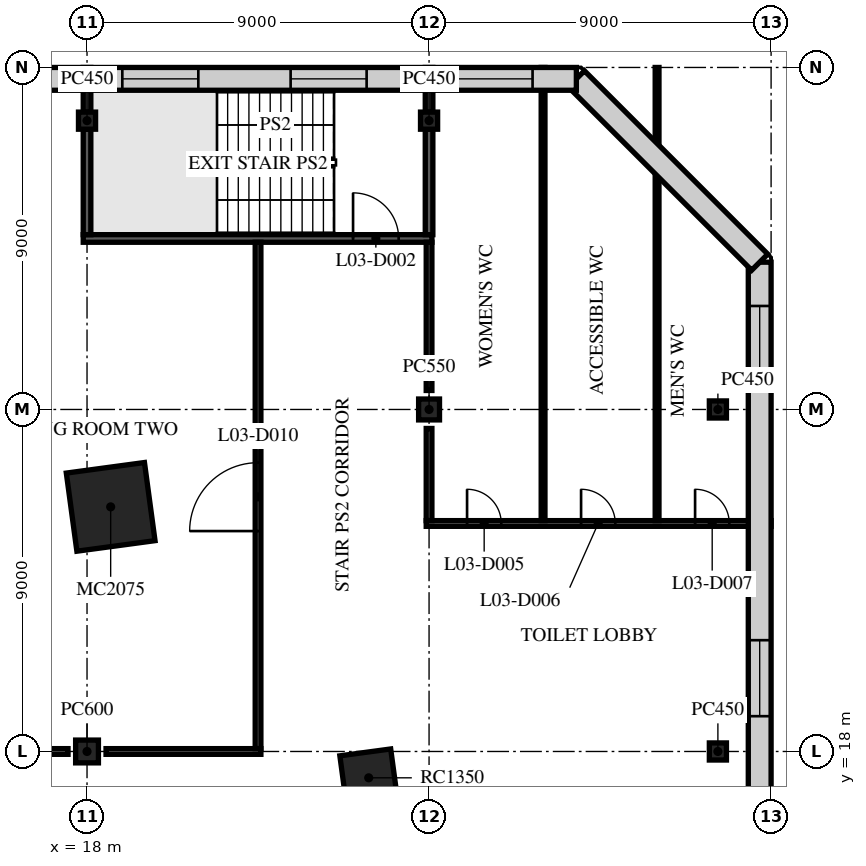
"""IFC4 building model, lengths in metres.
Left out: names, types, materials, properties, quantities, classifications, styles, units other than length and angle.
Written with IfcOpenShell. Run it as: python <this file> out.ifc"""

import sys

from ifc_helpers import new_model, si_unit, direction, frame, frame_2d, origin, origin_2d, place, context, subcontext, project, spatial, rectangle, extrude, element, fill, save


model = new_model("IFC4")
c1 = context("Model", 3, precision=1e-05, world=origin(), true_north=direction((0.0, 1.0)))
c2 = subcontext(c1, "Body", "Model", "MODEL_VIEW")
j1 = project(units=[si_unit("LENGTHUNIT", "METRE"), si_unit("PLANEANGLEUNIT", "RADIAN")], contexts=[c1])
p1 = place(None, origin())
s1 = spatial("IfcSite", under=j1, at=p1, CompositionType="ELEMENT")
p2 = place(p1, origin())
s2 = spatial("IfcBuilding", under=s1, at=p2, CompositionType="ELEMENT")
p3 = place(p2, frame((0.0, 0.0, 13.5)))
s3 = spatial("IfcBuildingStorey", under=s2, at=p3, CompositionType="ELEMENT", Elevation=13.5)
p4 = place(p3, frame((18.0, 18.0, 0.0), z_axis=(0.0, 0.0, 1.0), x_axis=(1.0, 0.0, 0.0)))
e1 = element("IfcColumn", 1, at=p4, inside=s3, PredefinedType="COLUMN", context=c2, shape_type="SweptSolid", body=[
    extrude(rectangle(XDim=0.6, YDim=0.6, at=origin_2d()), origin(), (0.0, 0.0, 1.0), 4.5),
])
p5 = place(p3, frame((18.0, 34.6, 0.0), z_axis=(0.0, 0.0, 1.0), x_axis=(1.0, 0.0, 0.0)))
e2 = element("IfcColumn", 2, at=p5, inside=s3, PredefinedType="COLUMN", context=c2, shape_type="SweptSolid", body=[
    extrude(rectangle(XDim=0.45, YDim=0.45, at=origin_2d()), origin(), (0.0, 0.0, 1.0), 4.5),
])
p6 = place(p3, frame((27.0, 27.0, 0.0), z_axis=(0.0, 0.0, 1.0), x_axis=(1.0, 0.0, 0.0)))
e3 = element("IfcColumn", 3, at=p6, inside=s3, PredefinedType="COLUMN", context=c2, shape_type="SweptSolid", body=[
    extrude(rectangle(XDim=0.55, YDim=0.55, at=origin_2d()), origin(), (0.0, 0.0, 1.0), 4.5),
])
for number, where, z_axis, x_axis in (
    (4, (27.0, 34.6, 0.0), (0.0, 0.0, 1.0), (1.0, 0.0, 0.0)),
    (5, (34.6, 18.0, 0.0), (0.0, 0.0, 1.0), (1.0, 0.0, 0.0)),
    (6, (34.6, 27.0, 0.0), (0.0, 0.0, 1.0), (1.0, 0.0, 0.0)),
):
    element("IfcColumn", number, at=place(p3, frame(where, z_axis=z_axis, x_axis=x_axis)), inside=s3, PredefinedType="COLUMN", context=c2, shape_type="SweptSolid", body=[
        extrude(rectangle(XDim=0.45, YDim=0.45, at=origin_2d()), origin(), (0.0, 0.0, 1.0), 4.5),
    ])
p7 = place(p3, frame((18.622, 24.437, 0.0), z_axis=(0.0, 0.0, 1.0), x_axis=(0.991001197216, 0.133853005627, 0.0)))
e7 = element("IfcColumn", 7, at=p7, inside=s3, PredefinedType="COLUMN", context=c2, shape_type="SweptSolid", body=[
    extrude(rectangle(XDim=2.075, YDim=2.075, at=origin_2d()), origin(), (0.0, 0.0, 1.0), 4.5),
])
p8 = place(p3, frame((25.412, 17.307, 0.0), z_axis=(0.0, 0.0, 1.0), x_axis=(0.991001197216, 0.133853005627, 0.0)))
e8 = element("IfcColumn", 8, at=p8, inside=s3, PredefinedType="COLUMN", context=c2, shape_type="SweptSolid", body=[
    extrude(rectangle(XDim=1.35, YDim=1.35, at=origin_2d()), origin(), (0.0, 0.0, 1.0), 4.5),
])
p9 = place(p3, frame((9.5, 18.0, 0.0), z_axis=(0.0, 0.0, 1.0), x_axis=(1.0, 0.0, 0.0)))
e9 = element("IfcWall", 9, at=p9, inside=s3, PredefinedType="PARTITIONING", context=c2, shape_type="SweptSolid", body=[
    extrude(rectangle(XDim=8.0, YDim=0.15, at=frame_2d((4.0, 0.0))), origin(), (0.0, 0.0, 1.0), 4.1),
])
p10 = place(p3, frame((18.5, 18.0, 0.0), z_axis=(0.0, 0.0, 1.0), x_axis=(1.0, 0.0, 0.0)))
e10 = element("IfcWall", 10, at=p10, inside=s3, PredefinedType="PARTITIONING", context=c2, shape_type="SweptSolid", body=[
    extrude(rectangle(XDim=4.075, YDim=0.15, at=frame_2d((2.038, 0.0))), origin(), (0.0, 0.0, 1.0), 4.1),
])
p11 = place(p3, frame((26.925, 24.0, 0.0), z_axis=(0.0, 0.0, 1.0), x_axis=(1.0, 0.0, 0.0)))
e11 = element("IfcWall", 11, at=p11, inside=s3, PredefinedType="PARTITIONING", context=c2, shape_type="SweptSolid", body=[
    extrude(rectangle(XDim=9.075, YDim=0.15, at=frame_2d((4.538, 0.0))), origin(), (0.0, 0.0, 1.0), 4.1),
])
p12 = place(p11, frame((1.075, 0.0, 0.0)))
e12 = element("IfcOpeningElement", 12, at=p12, cuts=e11, PredefinedType="OPENING", context=c2, shape_type="SweptSolid", body=[
    extrude(rectangle(XDim=0.9, YDim=2.1, at=frame_2d((0.45, 1.05))), frame((0.0, 0.085, 0.0), z_axis=(0.0, -1.0, 0.0), x_axis=(1.0, 0.0, 0.0)), (0.0, 0.0, 1.0), 0.17),
])
p13 = place(p11, frame((4.075, 0.0, 0.0)))
e13 = element("IfcOpeningElement", 13, at=p13, cuts=e11, PredefinedType="OPENING", context=c2, shape_type="SweptSolid", body=[
    extrude(rectangle(XDim=0.9, YDim=2.1, at=frame_2d((0.45, 1.05))), frame((0.0, 0.085, 0.0), z_axis=(0.0, -1.0, 0.0), x_axis=(1.0, 0.0, 0.0)), (0.0, 0.0, 1.0), 0.17),
])
p14 = place(p11, frame((7.075, 0.0, 0.0)))
e14 = element("IfcOpeningElement", 14, at=p14, cuts=e11, PredefinedType="OPENING", context=c2, shape_type="SweptSolid", body=[
    extrude(rectangle(XDim=0.9, YDim=2.1, at=frame_2d((0.45, 1.05))), frame((0.0, 0.085, 0.0), z_axis=(0.0, -1.0, 0.0), x_axis=(1.0, 0.0, 0.0)), (0.0, 0.0, 1.0), 0.17),
])
p15 = place(p3, frame((17.9, 31.5, 0.0), z_axis=(0.0, 0.0, 1.0), x_axis=(1.0, 0.0, 0.0)))
e15 = element("IfcWall", 15, at=p15, inside=s3, PredefinedType="PARTITIONING", context=c2, shape_type="SweptSolid", body=[
    extrude(rectangle(XDim=9.175, YDim=0.2, at=frame_2d((4.587, 0.0))), origin(), (0.0, 0.0, 1.0), 4.1),
])
p16 = place(p15, frame((7.1, 0.0, 0.0)))
e16 = element("IfcOpeningElement", 16, at=p16, cuts=e15, PredefinedType="OPENING", context=c2, shape_type="SweptSolid", body=[
    extrude(rectangle(XDim=1.2, YDim=2.1, at=frame_2d((0.6, 1.05))), frame((0.0, 0.11, 0.0), z_axis=(0.0, -1.0, 0.0), x_axis=(1.0, 0.0, 0.0)), (0.0, 0.0, 1.0), 0.22),
])
p17 = place(p3, frame((18.0, 31.6, 0.0), z_axis=(0.0, 0.0, 1.0), x_axis=(0.0, 1.0, 0.0)))
e17 = element("IfcWall", 17, at=p17, inside=s3, PredefinedType="PARTITIONING", context=c2, shape_type="SweptSolid", body=[
    extrude(rectangle(XDim=2.775, YDim=0.2, at=frame_2d((1.387, 0.0))), origin(), (0.0, 0.0, 1.0), 4.1),
])
p18 = place(p3, frame((18.0, 34.825, 0.0), z_axis=(0.0, 0.0, 1.0), x_axis=(0.0, 1.0, 0.0)))
e18 = element("IfcWall", 18, at=p18, inside=s3, PredefinedType="PARTITIONING", context=c2, shape_type="SweptSolid", body=[
    extrude(rectangle(XDim=1.175, YDim=0.2, at=frame_2d((0.587, 0.0))), origin(), (0.0, 0.0, 1.0), 4.1),
])
p19 = place(p3, frame((22.5, 18.075, 0.0), z_axis=(0.0, 0.0, 1.0), x_axis=(0.0, 1.0, 0.0)))
e19 = element("IfcWall", 19, at=p19, inside=s3, PredefinedType="PARTITIONING", context=c2, shape_type="SweptSolid", body=[
    extrude(rectangle(XDim=13.325, YDim=0.15, at=frame_2d((6.663, 0.0))), origin(), (0.0, 0.0, 1.0), 4.1),
])
p20 = place(p19, frame((5.725, 0.0, 0.0)))
e20 = element("IfcOpeningElement", 20, at=p20, cuts=e19, PredefinedType="OPENING", context=c2, shape_type="SweptSolid", body=[
    extrude(rectangle(XDim=1.8, YDim=2.1, at=frame_2d((0.9, 1.05))), frame((0.0, 0.085, 0.0), z_axis=(0.0, -1.0, 0.0), x_axis=(1.0, 0.0, 0.0)), (0.0, 0.0, 1.0), 0.17),
])
p21 = place(p3, frame((27.0, 24.075, 0.0), z_axis=(0.0, 0.0, 1.0), x_axis=(0.0, 1.0, 0.0)))
e21 = element("IfcWall", 21, at=p21, inside=s3, PredefinedType="PARTITIONING", context=c2, shape_type="SweptSolid", body=[
    extrude(rectangle(XDim=2.425, YDim=0.15, at=frame_2d((1.212, 0.0))), origin(), (0.0, 0.0, 1.0), 4.1),
])
p22 = place(p3, frame((27.0, 27.5, 0.0), z_axis=(0.0, 0.0, 1.0), x_axis=(0.0, 1.0, 0.0)))
e22 = element("IfcWall", 22, at=p22, inside=s3, PredefinedType="PARTITIONING", context=c2, shape_type="SweptSolid", body=[
    extrude(rectangle(XDim=3.9, YDim=0.15, at=frame_2d((1.95, 0.0))), origin(), (0.0, 0.0, 1.0), 4.1),
])
p23 = place(p3, frame((27.0, 31.6, 0.0), z_axis=(0.0, 0.0, 1.0), x_axis=(0.0, 1.0, 0.0)))
e23 = element("IfcWall", 23, at=p23, inside=s3, PredefinedType="PARTITIONING", context=c2, shape_type="SweptSolid", body=[
    extrude(rectangle(XDim=2.775, YDim=0.2, at=frame_2d((1.387, 0.0))), origin(), (0.0, 0.0, 1.0), 4.1),
])
p24 = place(p3, frame((27.0, 34.825, 0.0), z_axis=(0.0, 0.0, 1.0), x_axis=(0.0, 1.0, 0.0)))
e24 = element("IfcWall", 24, at=p24, inside=s3, PredefinedType="PARTITIONING", context=c2, shape_type="SweptSolid", body=[
    extrude(rectangle(XDim=1.175, YDim=0.2, at=frame_2d((0.587, 0.0))), origin(), (0.0, 0.0, 1.0), 4.1),
])
for number, where, z_axis, x_axis in (
    (25, (30.0, 24.075, 0.0), (0.0, 0.0, 1.0), (0.0, 1.0, 0.0)),
    (26, (33.0, 24.075, 0.0), (0.0, 0.0, 1.0), (0.0, 1.0, 0.0)),
):
    element("IfcWall", number, at=place(p3, frame(where, z_axis=z_axis, x_axis=x_axis)), inside=s3, PredefinedType="PARTITIONING", context=c2, shape_type="SweptSolid", body=[
        extrude(rectangle(XDim=11.925, YDim=0.1, at=frame_2d((5.962, 0.0))), origin(), (0.0, 0.0, 1.0), 4.1),
    ])
p25 = place(p3, frame((35.7, -30.876, 0.0), z_axis=(0.0, 0.0, 1.0), x_axis=(0.0, 1.0, 0.0)))
e27 = element("IfcWall", 27, at=p25, inside=s3, PredefinedType="STANDARD", context=c2, shape_type="SweptSolid", body=[
    extrude(rectangle(XDim=61.751, YDim=0.6, at=frame_2d((30.876, 0.0))), origin(), (0.0, 0.0, 1.0), 4.1),
])
p26 = place(p25, frame((1.152, 0.0, 0.9)))
e28 = element("IfcOpeningElement", 28, at=p26, cuts=e27, PredefinedType="OPENING", context=c2, shape_type="SweptSolid", body=[
    extrude(rectangle(XDim=2.0, YDim=3.0, at=frame_2d((1.0, 1.5))), frame((0.0, 0.31, 0.0), z_axis=(0.0, -1.0, 0.0), x_axis=(1.0, 0.0, 0.0)), (0.0, 0.0, 1.0), 0.62),
])
p27 = place(p25, frame((5.519, 0.0, 0.9)))
e29 = element("IfcOpeningElement", 29, at=p27, cuts=e27, PredefinedType="OPENING", context=c2, shape_type="SweptSolid", body=[
    extrude(rectangle(XDim=2.0, YDim=3.0, at=frame_2d((1.0, 1.5))), frame((0.0, 0.31, 0.0), z_axis=(0.0, -1.0, 0.0), x_axis=(1.0, 0.0, 0.0)), (0.0, 0.0, 1.0), 0.62),
])
p28 = place(p25, frame((9.947, 0.0, 0.9)))
e30 = element("IfcOpeningElement", 30, at=p28, cuts=e27, PredefinedType="OPENING", context=c2, shape_type="SweptSolid", body=[
    extrude(rectangle(XDim=2.0, YDim=3.0, at=frame_2d((1.0, 1.5))), frame((0.0, 0.31, 0.0), z_axis=(0.0, -1.0, 0.0), x_axis=(1.0, 0.0, 0.0)), (0.0, 0.0, 1.0), 0.62),
])
p29 = place(p25, frame((14.376, 0.0, 0.9)))
e31 = element("IfcOpeningElement", 31, at=p29, cuts=e27, PredefinedType="OPENING", context=c2, shape_type="SweptSolid", body=[
    extrude(rectangle(XDim=2.0, YDim=3.0, at=frame_2d((1.0, 1.5))), frame((0.0, 0.31, 0.0), z_axis=(0.0, -1.0, 0.0), x_axis=(1.0, 0.0, 0.0)), (0.0, 0.0, 1.0), 0.62),
])
p30 = place(p25, frame((18.804, 0.0, 0.9)))
e32 = element("IfcOpeningElement", 32, at=p30, cuts=e27, PredefinedType="OPENING", context=c2, shape_type="SweptSolid", body=[
    extrude(rectangle(XDim=2.0, YDim=3.0, at=frame_2d((1.0, 1.5))), frame((0.0, 0.31, 0.0), z_axis=(0.0, -1.0, 0.0), x_axis=(1.0, 0.0, 0.0)), (0.0, 0.0, 1.0), 0.62),
])
p31 = place(p25, frame((23.233, 0.0, 0.9)))
e33 = element("IfcOpeningElement", 33, at=p31, cuts=e27, PredefinedType="OPENING", context=c2, shape_type="SweptSolid", body=[
    extrude(rectangle(XDim=2.0, YDim=3.0, at=frame_2d((1.0, 1.5))), frame((0.0, 0.31, 0.0), z_axis=(0.0, -1.0, 0.0), x_axis=(1.0, 0.0, 0.0)), (0.0, 0.0, 1.0), 0.62),
])
p32 = place(p25, frame((27.662, 0.0, 0.9)))
e34 = element("IfcOpeningElement", 34, at=p32, cuts=e27, PredefinedType="OPENING", context=c2, shape_type="SweptSolid", body=[
    extrude(rectangle(XDim=2.0, YDim=3.0, at=frame_2d((1.0, 1.5))), frame((0.0, 0.31, 0.0), z_axis=(0.0, -1.0, 0.0), x_axis=(1.0, 0.0, 0.0)), (0.0, 0.0, 1.0), 0.62),
])
p33 = place(p25, frame((32.09, 0.0, 0.9)))
e35 = element("IfcOpeningElement", 35, at=p33, cuts=e27, PredefinedType="OPENING", context=c2, shape_type="SweptSolid", body=[
    extrude(rectangle(XDim=2.0, YDim=3.0, at=frame_2d((1.0, 1.5))), frame((0.0, 0.31, 0.0), z_axis=(0.0, -1.0, 0.0), x_axis=(1.0, 0.0, 0.0)), (0.0, 0.0, 1.0), 0.62),
])
p34 = place(p25, frame((36.519, 0.0, 0.9)))
e36 = element("IfcOpeningElement", 36, at=p34, cuts=e27, PredefinedType="OPENING", context=c2, shape_type="SweptSolid", body=[
    extrude(rectangle(XDim=2.0, YDim=3.0, at=frame_2d((1.0, 1.5))), frame((0.0, 0.31, 0.0), z_axis=(0.0, -1.0, 0.0), x_axis=(1.0, 0.0, 0.0)), (0.0, 0.0, 1.0), 0.62),
])
p35 = place(p25, frame((45.376, 0.0, 0.9)))
e37 = element("IfcOpeningElement", 37, at=p35, cuts=e27, PredefinedType="OPENING", context=c2, shape_type="SweptSolid", body=[
    extrude(rectangle(XDim=2.0, YDim=3.0, at=frame_2d((1.0, 1.5))), frame((0.0, 0.31, 0.0), z_axis=(0.0, -1.0, 0.0), x_axis=(1.0, 0.0, 0.0)), (0.0, 0.0, 1.0), 0.62),
])
p36 = place(p25, frame((49.804, 0.0, 0.9)))
e38 = element("IfcOpeningElement", 38, at=p36, cuts=e27, PredefinedType="OPENING", context=c2, shape_type="SweptSolid", body=[
    extrude(rectangle(XDim=2.0, YDim=3.0, at=frame_2d((1.0, 1.5))), frame((0.0, 0.31, 0.0), z_axis=(0.0, -1.0, 0.0), x_axis=(1.0, 0.0, 0.0)), (0.0, 0.0, 1.0), 0.62),
])
p37 = place(p25, frame((58.599, 0.0, 0.9)))
e39 = element("IfcOpeningElement", 39, at=p37, cuts=e27, PredefinedType="OPENING", context=c2, shape_type="SweptSolid", body=[
    extrude(rectangle(XDim=2.0, YDim=3.0, at=frame_2d((1.0, 1.5))), frame((0.0, 0.31, 0.0), z_axis=(0.0, -1.0, 0.0), x_axis=(1.0, 0.0, 0.0)), (0.0, 0.0, 1.0), 0.62),
])
p38 = place(p3, frame((35.7, 30.876, 0.0), z_axis=(0.0, 0.0, 1.0), x_axis=(-0.707106781187, 0.707106781187, 0.0)))
e40 = element("IfcWall", 40, at=p38, inside=s3, PredefinedType="STANDARD", context=c2, shape_type="SweptSolid", body=[
    extrude(rectangle(XDim=6.823, YDim=0.6, at=frame_2d((3.411, 0.0))), origin(), (0.0, 0.0, 1.0), 4.1),
])
p39 = place(p3, frame((30.876, 35.7, 0.0), z_axis=(0.0, 0.0, 1.0), x_axis=(-1.0, 0.0, 0.0)))
e41 = element("IfcWall", 41, at=p39, inside=s3, PredefinedType="STANDARD", context=c2, shape_type="SweptSolid", body=[
    extrude(rectangle(XDim=61.751, YDim=0.6, at=frame_2d((30.876, 0.0))), origin(), (0.0, 0.0, 1.0), 4.1),
])
p40 = place(p39, frame((1.152, 0.0, 0.9)))
e42 = element("IfcOpeningElement", 42, at=p40, cuts=e41, PredefinedType="OPENING", context=c2, shape_type="SweptSolid", body=[
    extrude(rectangle(XDim=2.0, YDim=3.0, at=frame_2d((1.0, 1.5))), frame((0.0, 0.31, 0.0), z_axis=(0.0, -1.0, 0.0), x_axis=(1.0, 0.0, 0.0)), (0.0, 0.0, 1.0), 0.62),
])
p41 = place(p39, frame((5.519, 0.0, 0.9)))
e43 = element("IfcOpeningElement", 43, at=p41, cuts=e41, PredefinedType="OPENING", context=c2, shape_type="SweptSolid", body=[
    extrude(rectangle(XDim=2.0, YDim=3.0, at=frame_2d((1.0, 1.5))), frame((0.0, 0.31, 0.0), z_axis=(0.0, -1.0, 0.0), x_axis=(1.0, 0.0, 0.0)), (0.0, 0.0, 1.0), 0.62),
])
p42 = place(p39, frame((9.947, 0.0, 0.9)))
e44 = element("IfcOpeningElement", 44, at=p42, cuts=e41, PredefinedType="OPENING", context=c2, shape_type="SweptSolid", body=[
    extrude(rectangle(XDim=2.0, YDim=3.0, at=frame_2d((1.0, 1.5))), frame((0.0, 0.31, 0.0), z_axis=(0.0, -1.0, 0.0), x_axis=(1.0, 0.0, 0.0)), (0.0, 0.0, 1.0), 0.62),
])
p43 = place(p39, frame((14.376, 0.0, 0.9)))
e45 = element("IfcOpeningElement", 45, at=p43, cuts=e41, PredefinedType="OPENING", context=c2, shape_type="SweptSolid", body=[
    extrude(rectangle(XDim=2.0, YDim=3.0, at=frame_2d((1.0, 1.5))), frame((0.0, 0.31, 0.0), z_axis=(0.0, -1.0, 0.0), x_axis=(1.0, 0.0, 0.0)), (0.0, 0.0, 1.0), 0.62),
])
p44 = place(p39, frame((18.804, 0.0, 0.9)))
e46 = element("IfcOpeningElement", 46, at=p44, cuts=e41, PredefinedType="OPENING", context=c2, shape_type="SweptSolid", body=[
    extrude(rectangle(XDim=2.0, YDim=3.0, at=frame_2d((1.0, 1.5))), frame((0.0, 0.31, 0.0), z_axis=(0.0, -1.0, 0.0), x_axis=(1.0, 0.0, 0.0)), (0.0, 0.0, 1.0), 0.62),
])
p45 = place(p39, frame((23.233, 0.0, 0.9)))
e47 = element("IfcOpeningElement", 47, at=p45, cuts=e41, PredefinedType="OPENING", context=c2, shape_type="SweptSolid", body=[
    extrude(rectangle(XDim=2.0, YDim=3.0, at=frame_2d((1.0, 1.5))), frame((0.0, 0.31, 0.0), z_axis=(0.0, -1.0, 0.0), x_axis=(1.0, 0.0, 0.0)), (0.0, 0.0, 1.0), 0.62),
])
p46 = place(p39, frame((27.662, 0.0, 0.9)))
e48 = element("IfcOpeningElement", 48, at=p46, cuts=e41, PredefinedType="OPENING", context=c2, shape_type="SweptSolid", body=[
    extrude(rectangle(XDim=2.0, YDim=3.0, at=frame_2d((1.0, 1.5))), frame((0.0, 0.31, 0.0), z_axis=(0.0, -1.0, 0.0), x_axis=(1.0, 0.0, 0.0)), (0.0, 0.0, 1.0), 0.62),
])
p47 = place(p39, frame((32.09, 0.0, 0.9)))
e49 = element("IfcOpeningElement", 49, at=p47, cuts=e41, PredefinedType="OPENING", context=c2, shape_type="SweptSolid", body=[
    extrude(rectangle(XDim=2.0, YDim=3.0, at=frame_2d((1.0, 1.5))), frame((0.0, 0.31, 0.0), z_axis=(0.0, -1.0, 0.0), x_axis=(1.0, 0.0, 0.0)), (0.0, 0.0, 1.0), 0.62),
])
p48 = place(p39, frame((36.519, 0.0, 0.9)))
e50 = element("IfcOpeningElement", 50, at=p48, cuts=e41, PredefinedType="OPENING", context=c2, shape_type="SweptSolid", body=[
    extrude(rectangle(XDim=2.0, YDim=3.0, at=frame_2d((1.0, 1.5))), frame((0.0, 0.31, 0.0), z_axis=(0.0, -1.0, 0.0), x_axis=(1.0, 0.0, 0.0)), (0.0, 0.0, 1.0), 0.62),
])
p49 = place(p39, frame((40.947, 0.0, 0.9)))
e51 = element("IfcOpeningElement", 51, at=p49, cuts=e41, PredefinedType="OPENING", context=c2, shape_type="SweptSolid", body=[
    extrude(rectangle(XDim=2.0, YDim=3.0, at=frame_2d((1.0, 1.5))), frame((0.0, 0.31, 0.0), z_axis=(0.0, -1.0, 0.0), x_axis=(1.0, 0.0, 0.0)), (0.0, 0.0, 1.0), 0.62),
])
p50 = place(p39, frame((45.376, 0.0, 0.9)))
e52 = element("IfcOpeningElement", 52, at=p50, cuts=e41, PredefinedType="OPENING", context=c2, shape_type="SweptSolid", body=[
    extrude(rectangle(XDim=2.0, YDim=3.0, at=frame_2d((1.0, 1.5))), frame((0.0, 0.31, 0.0), z_axis=(0.0, -1.0, 0.0), x_axis=(1.0, 0.0, 0.0)), (0.0, 0.0, 1.0), 0.62),
])
p51 = place(p39, frame((49.804, 0.0, 0.9)))
e53 = element("IfcOpeningElement", 53, at=p51, cuts=e41, PredefinedType="OPENING", context=c2, shape_type="SweptSolid", body=[
    extrude(rectangle(XDim=2.0, YDim=3.0, at=frame_2d((1.0, 1.5))), frame((0.0, 0.31, 0.0), z_axis=(0.0, -1.0, 0.0), x_axis=(1.0, 0.0, 0.0)), (0.0, 0.0, 1.0), 0.62),
])
p52 = place(p39, frame((54.233, 0.0, 0.9)))
e54 = element("IfcOpeningElement", 54, at=p52, cuts=e41, PredefinedType="OPENING", context=c2, shape_type="SweptSolid", body=[
    extrude(rectangle(XDim=2.0, YDim=3.0, at=frame_2d((1.0, 1.5))), frame((0.0, 0.31, 0.0), z_axis=(0.0, -1.0, 0.0), x_axis=(1.0, 0.0, 0.0)), (0.0, 0.0, 1.0), 0.62),
])
p53 = place(p39, frame((58.599, 0.0, 0.9)))
e55 = element("IfcOpeningElement", 55, at=p53, cuts=e41, PredefinedType="OPENING", context=c2, shape_type="SweptSolid", body=[
    extrude(rectangle(XDim=2.0, YDim=3.0, at=frame_2d((1.0, 1.5))), frame((0.0, 0.31, 0.0), z_axis=(0.0, -1.0, 0.0), x_axis=(1.0, 0.0, 0.0)), (0.0, 0.0, 1.0), 0.62),
])
p54 = place(p16, origin())
e56 = element("IfcDoor", 56, at=p54, inside=s3, OperationType="SINGLE_SWING_RIGHT", PredefinedType="DOOR", context=c2, shape_type="SweptSolid", body=[
    extrude(rectangle(XDim=1.2, YDim=2.1, at=frame_2d((0.6, 1.05))), frame((0.0, 0.025, 0.0), z_axis=(0.0, -1.0, 0.0), x_axis=(1.0, 0.0, 0.0)), (0.0, 0.0, 1.0), 0.05),
])
fill(e16, e56)
p55 = place(p12, origin())
e57 = element("IfcDoor", 57, at=p55, inside=s3, OperationType="SINGLE_SWING_LEFT", PredefinedType="DOOR", context=c2, shape_type="SweptSolid", body=[
    extrude(rectangle(XDim=0.9, YDim=2.1, at=frame_2d((0.45, 1.05))), frame((0.0, 0.025, 0.0), z_axis=(0.0, -1.0, 0.0), x_axis=(1.0, 0.0, 0.0)), (0.0, 0.0, 1.0), 0.05),
])
fill(e12, e57)
p56 = place(p13, origin())
e58 = element("IfcDoor", 58, at=p56, inside=s3, OperationType="SINGLE_SWING_RIGHT", PredefinedType="DOOR", context=c2, shape_type="SweptSolid", body=[
    extrude(rectangle(XDim=0.9, YDim=2.1, at=frame_2d((0.45, 1.05))), frame((0.0, 0.025, 0.0), z_axis=(0.0, -1.0, 0.0), x_axis=(1.0, 0.0, 0.0)), (0.0, 0.0, 1.0), 0.05),
])
fill(e13, e58)
p57 = place(p14, origin())
e59 = element("IfcDoor", 59, at=p57, inside=s3, OperationType="SINGLE_SWING_LEFT", PredefinedType="DOOR", context=c2, shape_type="SweptSolid", body=[
    extrude(rectangle(XDim=0.9, YDim=2.1, at=frame_2d((0.45, 1.05))), frame((0.0, 0.025, 0.0), z_axis=(0.0, -1.0, 0.0), x_axis=(1.0, 0.0, 0.0)), (0.0, 0.0, 1.0), 0.05),
])
fill(e14, e59)
p58 = place(p20, origin())
e60 = element("IfcDoor", 60, at=p58, inside=s3, OperationType="DOUBLE_DOOR_SINGLE_SWING", PredefinedType="DOOR", context=c2, shape_type="SweptSolid", body=[
    extrude(rectangle(XDim=1.8, YDim=2.1, at=frame_2d((0.9, 1.05))), frame((0.0, 0.025, 0.0), z_axis=(0.0, -1.0, 0.0), x_axis=(1.0, 0.0, 0.0)), (0.0, 0.0, 1.0), 0.05),
])
fill(e20, e60)
p59 = place(p36, origin())
e61 = element("IfcWindow", 61, at=p59, inside=s3, PartitioningType="SINGLE_PANEL", PredefinedType="WINDOW", context=c2, shape_type="SweptSolid", body=[
    extrude(rectangle(XDim=2.0, YDim=3.0, at=frame_2d((1.0, 1.5))), frame((0.0, 0.03, 0.0), z_axis=(0.0, -1.0, 0.0), x_axis=(1.0, 0.0, 0.0)), (0.0, 0.0, 1.0), 0.06),
])
fill(e38, e61)
p60 = place(p37, origin())
e62 = element("IfcWindow", 62, at=p60, inside=s3, PartitioningType="SINGLE_PANEL", PredefinedType="WINDOW", context=c2, shape_type="SweptSolid", body=[
    extrude(rectangle(XDim=2.0, YDim=3.0, at=frame_2d((1.0, 1.5))), frame((0.0, 0.03, 0.0), z_axis=(0.0, -1.0, 0.0), x_axis=(1.0, 0.0, 0.0)), (0.0, 0.0, 1.0), 0.06),
])
fill(e39, e62)
p61 = place(p40, origin())
e63 = element("IfcWindow", 63, at=p61, inside=s3, PartitioningType="SINGLE_PANEL", PredefinedType="WINDOW", context=c2, shape_type="SweptSolid", body=[
    extrude(rectangle(XDim=2.0, YDim=3.0, at=frame_2d((1.0, 1.5))), frame((0.0, 0.03, 0.0), z_axis=(0.0, -1.0, 0.0), x_axis=(1.0, 0.0, 0.0)), (0.0, 0.0, 1.0), 0.06),
])
fill(e42, e63)
p62 = place(p41, origin())
e64 = element("IfcWindow", 64, at=p62, inside=s3, PartitioningType="SINGLE_PANEL", PredefinedType="WINDOW", context=c2, shape_type="SweptSolid", body=[
    extrude(rectangle(XDim=2.0, YDim=3.0, at=frame_2d((1.0, 1.5))), frame((0.0, 0.03, 0.0), z_axis=(0.0, -1.0, 0.0), x_axis=(1.0, 0.0, 0.0)), (0.0, 0.0, 1.0), 0.06),
])
fill(e43, e64)
p63 = place(p42, origin())
e65 = element("IfcWindow", 65, at=p63, inside=s3, PartitioningType="SINGLE_PANEL", PredefinedType="WINDOW", context=c2, shape_type="SweptSolid", body=[
    extrude(rectangle(XDim=2.0, YDim=3.0, at=frame_2d((1.0, 1.5))), frame((0.0, 0.03, 0.0), z_axis=(0.0, -1.0, 0.0), x_axis=(1.0, 0.0, 0.0)), (0.0, 0.0, 1.0), 0.06),
])
fill(e44, e65)
save(model, sys.argv[1])
